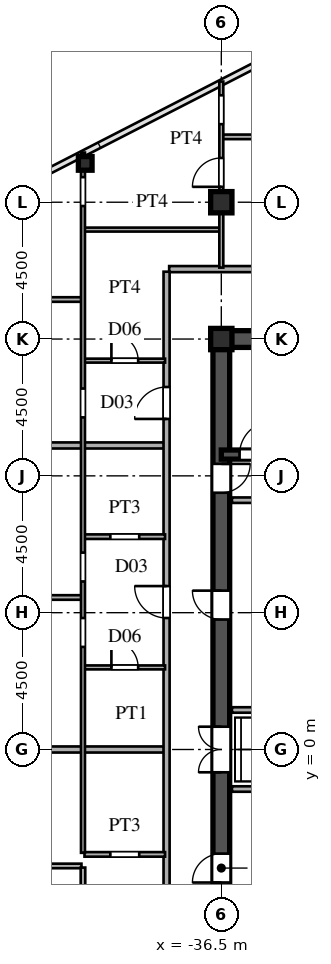
"""IFC4 building model, lengths in metres.
Left out: names, types, materials, properties, quantities, classifications, styles, units other than length and angle.
Written with IfcOpenShell. Run it as: python <this file> out.ifc"""

import sys

from ifc_helpers import new_model, si_unit, direction, frame, frame_2d, origin, origin_2d, place, context, subcontext, project, spatial, rectangle, hollow_rectangle, i_section, extrude, source, transform, mapped, element, fill, save


model = new_model("IFC4")
c1 = context("Model", 3, precision=1e-05, world=origin(), true_north=direction((0.0, 1.0)))
c2 = subcontext(c1, "Body", "Model", "MODEL_VIEW")
j1 = project(units=[si_unit("LENGTHUNIT", "METRE"), si_unit("PLANEANGLEUNIT", "RADIAN")], contexts=[c1])
p1 = place(None, origin())
s1 = spatial("IfcSite", under=j1, at=p1, CompositionType="ELEMENT")
p2 = place(p1, origin())
s2 = spatial("IfcBuilding", under=s1, at=p2, CompositionType="ELEMENT")
p3 = place(p2, frame((0.0, 0.0, 140.4)))
s3 = spatial("IfcBuildingStorey", under=s2, at=p3, CompositionType="ELEMENT", Elevation=140.4)
m1 = source(origin(), c2, "Body", "SweptSolid", [
    extrude(i_section(OverallWidth=0.7, OverallDepth=0.7, WebThickness=0.028, FlangeThickness=0.045, at=origin_2d()), origin(), (0.0, 0.0, 1.0), 3.6),
])
for number, where, z_axis, x_axis in (
    (1, (-36.5, 13.5, 0.0), (0.0, 0.0, 1.0), (1.0, 0.0, 0.0)),
    (2, (-36.5, 18.0, 0.0), (0.0, 0.0, 1.0), (1.0, 0.0, 0.0)),
):
    element("IfcColumn", number, at=place(p3, frame(where, z_axis=z_axis, x_axis=x_axis)), inside=s3, PredefinedType="COLUMN", context=c2, shape_type="MappedRepresentation", body=[
        mapped(m1, transform((0.0, 0.0, 0.0), scale=1.0)),
    ])
m2 = source(origin(), c2, "Body", "SweptSolid", [
    extrude(hollow_rectangle(XDim=0.45, YDim=0.45, WallThickness=0.018, at=origin_2d()), origin(), (0.0, 0.0, 1.0), 3.6),
])
p4 = place(p3, frame((-40.976, 19.278, 0.0), z_axis=(0.0, 0.0, 1.0), x_axis=(1.0, 0.0, 0.0)))
e3 = element("IfcColumn", 3, at=p4, inside=s3, PredefinedType="COLUMN", context=c2, shape_type="MappedRepresentation", body=[
    mapped(m2, transform((0.0, 0.0, 0.0), scale=1.0)),
])
p5 = place(p3, frame((-36.5, 13.5, 0.0), z_axis=(0.0, 0.0, 1.0), x_axis=(1.0, 0.0, 0.0)))
e4 = element("IfcWall", 4, at=p5, inside=s3, PredefinedType="SHEAR", context=c2, shape_type="SweptSolid", body=[
    extrude(rectangle(XDim=9.0, YDim=0.55, at=frame_2d((4.5, 0.0))), origin(), (0.0, 0.0, 1.0), 3.38),
])
p6 = place(p3, frame((-36.5, -1.3, 0.0), z_axis=(0.0, 0.0, 1.0), x_axis=(0.0, 1.0, 0.0)))
e5 = element("IfcWall", 5, at=p6, inside=s3, PredefinedType="SHEAR", context=c2, shape_type="SweptSolid", body=[
    extrude(rectangle(XDim=2.6, YDim=0.55, at=frame_2d((1.3, 0.0))), origin(), (0.0, 0.0, 1.0), 3.38),
])
p7 = place(p6, frame((0.55, 0.0, 0.0)))
e6 = element("IfcOpeningElement", 6, at=p7, cuts=e5, PredefinedType="OPENING", context=c2, shape_type="SweptSolid", body=[
    extrude(rectangle(XDim=1.5, YDim=2.3, at=frame_2d((0.75, 1.15))), frame((0.0, 0.285, 0.0), z_axis=(0.0, -1.0, 0.0), x_axis=(1.0, 0.0, 0.0)), (0.0, 0.0, 1.0), 0.57),
])
p8 = place(p3, frame((-36.5, 8.2, 0.0), z_axis=(0.0, 0.0, 1.0), x_axis=(0.0, 1.0, 0.0)))
e7 = element("IfcWall", 7, at=p8, inside=s3, PredefinedType="SHEAR", context=c2, shape_type="SweptSolid", body=[
    extrude(rectangle(XDim=5.45, YDim=0.55, at=frame_2d((2.725, 0.0))), origin(), (0.0, 0.0, 1.0), 3.38),
])
p9 = place(p8, frame((0.245, 0.0, 0.0)))
e8 = element("IfcOpeningElement", 8, at=p9, cuts=e7, PredefinedType="OPENING", context=c2, shape_type="SweptSolid", body=[
    extrude(rectangle(XDim=0.95, YDim=2.15, at=frame_2d((0.475, 1.075))), frame((0.0, 0.285, 0.0), z_axis=(0.0, -1.0, 0.0), x_axis=(1.0, 0.0, 0.0)), (0.0, 0.0, 1.0), 0.57),
])
p10 = place(p3, frame((-36.5, -6.5, 0.0), z_axis=(0.0, 0.0, 1.0), x_axis=(0.0, 1.0, 0.0)))
e9 = element("IfcWall", 9, at=p10, inside=s3, PredefinedType="SHEAR", context=c2, shape_type="SweptSolid", body=[
    extrude(rectangle(XDim=5.2, YDim=0.55, at=frame_2d((2.6, 0.0))), origin(), (0.0, 0.0, 1.0), 3.38),
])
p11 = place(p10, frame((2.125, 0.0, 0.0)))
e10 = element("IfcOpeningElement", 10, at=p11, cuts=e9, PredefinedType="OPENING", context=c2, shape_type="SweptSolid", body=[
    extrude(rectangle(XDim=0.95, YDim=2.15, at=frame_2d((0.475, 1.075))), frame((0.0, 0.285, 0.0), z_axis=(0.0, -1.0, 0.0), x_axis=(1.0, 0.0, 0.0)), (0.0, 0.0, 1.0), 0.57),
])
p12 = place(p3, frame((-36.5, 1.3, 0.0), z_axis=(0.0, 0.0, 1.0), x_axis=(0.0, 1.0, 0.0)))
e11 = element("IfcWall", 11, at=p12, inside=s3, PredefinedType="SHEAR", context=c2, shape_type="SweptSolid", body=[
    extrude(rectangle(XDim=6.9, YDim=0.55, at=frame_2d((3.45, 0.0))), origin(), (0.0, 0.0, 1.0), 3.38),
])
p13 = place(p12, frame((2.975, 0.0, 0.0)))
e12 = element("IfcOpeningElement", 12, at=p13, cuts=e11, PredefinedType="OPENING", context=c2, shape_type="SweptSolid", body=[
    extrude(rectangle(XDim=0.95, YDim=2.15, at=frame_2d((0.475, 1.075))), frame((0.0, 0.285, 0.0), z_axis=(0.0, -1.0, 0.0), x_axis=(1.0, 0.0, 0.0)), (0.0, 0.0, 1.0), 0.57),
])
p14 = place(p3, frame((-36.5, 9.7, 0.0), z_axis=(0.0, 0.0, 1.0), x_axis=(1.0, 0.0, 0.0)))
e13 = element("IfcWall", 13, at=p14, inside=s3, PredefinedType="SHEAR", context=c2, shape_type="SweptSolid", body=[
    extrude(rectangle(XDim=9.0, YDim=0.3, at=frame_2d((4.5, 0.0))), origin(), (0.0, 0.0, 1.0), 3.38),
])
p15 = place(p14, frame((0.6, 0.0, 0.0)))
e14 = element("IfcOpeningElement", 14, at=p15, cuts=e13, PredefinedType="OPENING", context=c2, shape_type="SweptSolid", body=[
    extrude(rectangle(XDim=1.1, YDim=2.2, at=frame_2d((0.55, 1.1))), frame((0.0, 0.16, 0.0), z_axis=(0.0, -1.0, 0.0), x_axis=(1.0, 0.0, 0.0)), (0.0, 0.0, 1.0), 0.32),
])
p16 = place(p3, frame((-36.15, 8.2, 0.0), z_axis=(0.0, 0.0, 1.0), x_axis=(1.0, 0.0, 0.0)))
e15 = element("IfcWall", 15, at=p16, inside=s3, PredefinedType="PARTITIONING", context=c2, shape_type="SweptSolid", body=[
    extrude(rectangle(XDim=5.7, YDim=0.18, at=frame_2d((2.85, 0.0))), origin(), (0.0, 0.0, 1.0), 3.38),
])
for number, where, z_axis, x_axis in (
    (16, (-36.15, -1.3, 0.0), (0.0, 0.0, 1.0), (1.0, 0.0, 0.0)),
    (17, (-36.15, 1.3, 0.0), (0.0, 0.0, 1.0), (1.0, 0.0, 0.0)),
):
    element("IfcWall", number, at=place(p3, frame(where, z_axis=z_axis, x_axis=x_axis)), inside=s3, PredefinedType="PARTITIONING", context=c2, shape_type="SweptSolid", body=[
        extrude(rectangle(XDim=2.95, YDim=0.18, at=frame_2d((1.475, 0.0))), origin(), (0.0, 0.0, 1.0), 3.38),
    ])
p17 = place(p3, frame((-69.535, -3.83, 0.0), z_axis=(0.0, 0.0, 1.0), x_axis=(1.0, 0.0, 0.0)))
e18 = element("IfcWall", 18, at=p17, inside=s3, PredefinedType="PARTITIONING", context=c2, shape_type="SweptSolid", body=[
    extrude(rectangle(XDim=28.435, YDim=0.15, at=frame_2d((14.217, 0.0))), origin(), (0.0, 0.0, 1.0), 3.38),
])
p18 = place(p17, frame((21.285, 0.0, 0.0)))
e19 = element("IfcOpeningElement", 19, at=p18, cuts=e18, PredefinedType="OPENING", context=c2, shape_type="SweptSolid", body=[
    extrude(rectangle(XDim=0.95, YDim=2.15, at=frame_2d((0.475, 1.075))), frame((0.0, 0.085, 0.0), z_axis=(0.0, -1.0, 0.0), x_axis=(1.0, 0.0, 0.0)), (0.0, 0.0, 1.0), 0.17),
])
p19 = place(p3, frame((-41.0, -3.45, 0.0), z_axis=(0.0, 0.0, 1.0), x_axis=(1.0, 0.0, 0.0)))
e20 = element("IfcWall", 20, at=p19, inside=s3, PredefinedType="PARTITIONING", context=c2, shape_type="SweptSolid", body=[
    extrude(rectangle(XDim=2.65, YDim=0.15, at=frame_2d((1.325, 0.0))), origin(), (0.0, 0.0, 1.0), 3.38),
])
p20 = place(p19, frame((0.85, 0.0, 0.0)))
e21 = element("IfcOpeningElement", 21, at=p20, cuts=e20, PredefinedType="OPENING", context=c2, shape_type="SweptSolid", body=[
    extrude(rectangle(XDim=0.95, YDim=2.15, at=frame_2d((0.475, 1.075))), frame((0.0, 0.085, 0.0), z_axis=(0.0, -1.0, 0.0), x_axis=(1.0, 0.0, 0.0)), (0.0, 0.0, 1.0), 0.17),
])
p21 = place(p3, frame((-69.505, 0.0, 0.0), z_axis=(0.0, 0.0, 1.0), x_axis=(1.0, 0.0, 0.0)))
e22 = element("IfcWall", 22, at=p21, inside=s3, PredefinedType="PARTITIONING", context=c2, shape_type="SweptSolid", body=[
    extrude(rectangle(XDim=31.125, YDim=0.2, at=frame_2d((15.562, 0.0))), origin(), (0.0, 0.0, 1.0), 3.38),
])
p22 = place(p3, frame((-41.0, 2.7, 0.0), z_axis=(0.0, 0.0, 1.0), x_axis=(1.0, 0.0, 0.0)))
e23 = element("IfcWall", 23, at=p22, inside=s3, PredefinedType="PARTITIONING", context=c2, shape_type="SweptSolid", body=[
    extrude(rectangle(XDim=2.65, YDim=0.13, at=frame_2d((1.325, 0.0))), origin(), (0.0, 0.0, 1.0), 3.38),
])
p23 = place(p22, frame((0.885, 0.0, 0.0)))
e24 = element("IfcOpeningElement", 24, at=p23, cuts=e23, PredefinedType="OPENING", context=c2, shape_type="SweptSolid", body=[
    extrude(rectangle(XDim=0.88, YDim=2.1, at=frame_2d((0.44, 1.05))), frame((0.0, 0.075, 0.0), z_axis=(0.0, -1.0, 0.0), x_axis=(1.0, 0.0, 0.0)), (0.0, 0.0, 1.0), 0.15),
])
p24 = place(p3, frame((-69.226, 5.0, 0.0), z_axis=(0.0, 0.0, 1.0), x_axis=(1.0, 0.0, 0.0)))
e25 = element("IfcWall", 25, at=p24, inside=s3, PredefinedType="PARTITIONING", context=c2, shape_type="SweptSolid", body=[
    extrude(rectangle(XDim=28.126, YDim=0.15, at=frame_2d((14.063, 0.0))), origin(), (0.0, 0.0, 1.0), 3.38),
])
p25 = place(p24, frame((11.401, 0.0, 0.0)))
e26 = element("IfcOpeningElement", 26, at=p25, cuts=e25, PredefinedType="OPENING", context=c2, shape_type="SweptSolid", body=[
    extrude(rectangle(XDim=0.95, YDim=2.15, at=frame_2d((0.475, 1.075))), frame((0.0, 0.085, 0.0), z_axis=(0.0, -1.0, 0.0), x_axis=(1.0, 0.0, 0.0)), (0.0, 0.0, 1.0), 0.17),
])
p26 = place(p24, frame((17.614, 0.0, 0.0)))
e27 = element("IfcOpeningElement", 27, at=p26, cuts=e25, PredefinedType="OPENING", context=c2, shape_type="SweptSolid", body=[
    extrude(rectangle(XDim=0.95, YDim=2.15, at=frame_2d((0.475, 1.075))), frame((0.0, 0.085, 0.0), z_axis=(0.0, -1.0, 0.0), x_axis=(1.0, 0.0, 0.0)), (0.0, 0.0, 1.0), 0.17),
])
p27 = place(p3, frame((-41.0, 7.0, 0.0), z_axis=(0.0, 0.0, 1.0), x_axis=(1.0, 0.0, 0.0)))
e28 = element("IfcWall", 28, at=p27, inside=s3, PredefinedType="PARTITIONING", context=c2, shape_type="SweptSolid", body=[
    extrude(rectangle(XDim=2.65, YDim=0.15, at=frame_2d((1.325, 0.0))), origin(), (0.0, 0.0, 1.0), 3.38),
])
p28 = place(p27, frame((0.85, 0.0, 0.0)))
e29 = element("IfcOpeningElement", 29, at=p28, cuts=e28, PredefinedType="OPENING", context=c2, shape_type="SweptSolid", body=[
    extrude(rectangle(XDim=0.95, YDim=2.15, at=frame_2d((0.475, 1.075))), frame((0.0, 0.085, 0.0), z_axis=(0.0, -1.0, 0.0), x_axis=(1.0, 0.0, 0.0)), (0.0, 0.0, 1.0), 0.17),
])
p29 = place(p3, frame((-59.767, 10.0, 0.0), z_axis=(0.0, 0.0, 1.0), x_axis=(1.0, 0.0, 0.0)))
e30 = element("IfcWall", 30, at=p29, inside=s3, PredefinedType="PARTITIONING", context=c2, shape_type="SweptSolid", body=[
    extrude(rectangle(XDim=21.387, YDim=0.2, at=frame_2d((10.694, 0.0))), origin(), (0.0, 0.0, 1.0), 3.38),
])
p30 = place(p3, frame((-41.0, 12.79, 0.0), z_axis=(0.0, 0.0, 1.0), x_axis=(1.0, 0.0, 0.0)))
e31 = element("IfcWall", 31, at=p30, inside=s3, PredefinedType="PARTITIONING", context=c2, shape_type="SweptSolid", body=[
    extrude(rectangle(XDim=2.65, YDim=0.13, at=frame_2d((1.325, 0.0))), origin(), (0.0, 0.0, 1.0), 3.38),
])
p31 = place(p30, frame((0.885, 0.0, 0.0)))
e32 = element("IfcOpeningElement", 32, at=p31, cuts=e31, PredefinedType="OPENING", context=c2, shape_type="SweptSolid", body=[
    extrude(rectangle(XDim=0.88, YDim=2.1, at=frame_2d((0.44, 1.05))), frame((0.0, 0.075, 0.0), z_axis=(0.0, -1.0, 0.0), x_axis=(1.0, 0.0, 0.0)), (0.0, 0.0, 1.0), 0.15),
])
p32 = place(p3, frame((-50.438, 14.8, 0.0), z_axis=(0.0, 0.0, 1.0), x_axis=(1.0, 0.0, 0.0)))
e33 = element("IfcWall", 33, at=p32, inside=s3, PredefinedType="PARTITIONING", context=c2, shape_type="SweptSolid", body=[
    extrude(rectangle(XDim=9.338, YDim=0.15, at=frame_2d((4.669, 0.0))), origin(), (0.0, 0.0, 1.0), 3.38),
])
p33 = place(p32, frame((5.551, 0.0, 0.0)))
e34 = element("IfcOpeningElement", 34, at=p33, cuts=e33, PredefinedType="OPENING", context=c2, shape_type="SweptSolid", body=[
    extrude(rectangle(XDim=0.95, YDim=2.15, at=frame_2d((0.475, 1.075))), frame((0.0, 0.085, 0.0), z_axis=(0.0, -1.0, 0.0), x_axis=(1.0, 0.0, 0.0)), (0.0, 0.0, 1.0), 0.17),
])
p34 = place(p3, frame((-38.215, 15.8, 0.0), z_axis=(0.0, 0.0, 1.0), x_axis=(1.0, 0.0, 0.0)))
e35 = element("IfcWall", 35, at=p34, inside=s3, PredefinedType="PARTITIONING", context=c2, shape_type="SweptSolid", body=[
    extrude(rectangle(XDim=10.715, YDim=0.2, at=frame_2d((5.357, 0.0))), origin(), (0.0, 0.0, 1.0), 3.38),
])
p35 = place(p3, frame((-41.0, 17.1, 0.0), z_axis=(0.0, 0.0, 1.0), x_axis=(1.0, 0.0, 0.0)))
e36 = element("IfcWall", 36, at=p35, inside=s3, PredefinedType="PARTITIONING", context=c2, shape_type="SweptSolid", body=[
    extrude(rectangle(XDim=4.45, YDim=0.13, at=frame_2d((2.225, 0.0))), origin(), (0.0, 0.0, 1.0), 3.38),
])
p36 = place(p3, frame((-36.45, 20.15, 0.0), z_axis=(0.0, 0.0, 1.0), x_axis=(1.0, 0.0, 0.0)))
e37 = element("IfcWall", 37, at=p36, inside=s3, PredefinedType="PARTITIONING", context=c2, shape_type="SweptSolid", body=[
    extrude(rectangle(XDim=8.649, YDim=0.15, at=frame_2d((4.325, 0.0))), origin(), (0.0, 0.0, 1.0), 3.38),
])
p37 = place(p3, frame((-41.05, -7.617, 0.0), z_axis=(0.0, 0.0, 1.0), x_axis=(0.0, 1.0, 0.0)))
e38 = element("IfcWall", 38, at=p37, inside=s3, PredefinedType="PARTITIONING", context=c2, shape_type="SweptSolid", body=[
    extrude(rectangle(XDim=3.734, YDim=0.15, at=frame_2d((1.867, 0.0))), origin(), (0.0, 0.0, 1.0), 2.99),
])
p38 = place(p37, frame((1.392, 0.0, 0.0)))
e39 = element("IfcOpeningElement", 39, at=p38, cuts=e38, PredefinedType="OPENING", context=c2, shape_type="SweptSolid", body=[
    extrude(rectangle(XDim=0.95, YDim=2.15, at=frame_2d((0.475, 1.075))), frame((0.0, 0.085, 0.0), z_axis=(0.0, -1.0, 0.0), x_axis=(1.0, 0.0, 0.0)), (0.0, 0.0, 1.0), 0.17),
])
p39 = place(p3, frame((-41.05, -3.398, 0.0), z_axis=(0.0, 0.0, 1.0), x_axis=(0.0, 1.0, 0.0)))
e40 = element("IfcWall", 40, at=p39, inside=s3, PredefinedType="PARTITIONING", context=c2, shape_type="SweptSolid", body=[
    extrude(rectangle(XDim=23.032, YDim=0.13, at=frame_2d((11.516, 0.0))), origin(), (0.0, 0.0, 1.0), 2.99),
])
p40 = place(p39, frame((6.772, 0.0, 0.0)))
e41 = element("IfcOpeningElement", 41, at=p40, cuts=e40, PredefinedType="OPENING", context=c2, shape_type="SweptSolid", body=[
    extrude(rectangle(XDim=0.95, YDim=2.15, at=frame_2d((0.475, 1.075))), frame((0.0, 0.075, 0.0), z_axis=(0.0, -1.0, 0.0), x_axis=(1.0, 0.0, 0.0)), (0.0, 0.0, 1.0), 0.15),
])
p41 = place(p39, frame((8.924, 0.0, 0.0)))
e42 = element("IfcOpeningElement", 42, at=p41, cuts=e40, PredefinedType="OPENING", context=c2, shape_type="SweptSolid", body=[
    extrude(rectangle(XDim=0.95, YDim=2.15, at=frame_2d((0.475, 1.075))), frame((0.0, 0.075, 0.0), z_axis=(0.0, -1.0, 0.0), x_axis=(1.0, 0.0, 0.0)), (0.0, 0.0, 1.0), 0.15),
])
p42 = place(p39, frame((14.321, 0.0, 0.0)))
e43 = element("IfcOpeningElement", 43, at=p42, cuts=e40, PredefinedType="OPENING", context=c2, shape_type="SweptSolid", body=[
    extrude(rectangle(XDim=0.95, YDim=2.15, at=frame_2d((0.475, 1.075))), frame((0.0, 0.075, 0.0), z_axis=(0.0, -1.0, 0.0), x_axis=(1.0, 0.0, 0.0)), (0.0, 0.0, 1.0), 0.15),
])
p43 = place(p39, frame((21.273, 0.0, 0.0)))
e44 = element("IfcOpeningElement", 44, at=p43, cuts=e40, PredefinedType="OPENING", context=c2, shape_type="SweptSolid", body=[
    extrude(rectangle(XDim=0.95, YDim=2.15, at=frame_2d((0.475, 1.075))), frame((0.0, 0.075, 0.0), z_axis=(0.0, -1.0, 0.0), x_axis=(1.0, 0.0, 0.0)), (0.0, 0.0, 1.0), 0.15),
])
p44 = place(p3, frame((-38.3, -15.715, 0.0), z_axis=(0.0, 0.0, 1.0), x_axis=(0.0, 1.0, 0.0)))
e45 = element("IfcWall", 45, at=p44, inside=s3, PredefinedType="PARTITIONING", context=c2, shape_type="SweptSolid", body=[
    extrude(rectangle(XDim=31.43, YDim=0.2, at=frame_2d((15.715, 0.0))), origin(), (0.0, 0.0, 1.0), 3.38),
])
p45 = place(p44, frame((2.39, 0.0, 0.0)))
e46 = element("IfcOpeningElement", 46, at=p45, cuts=e45, PredefinedType="OPENING", context=c2, shape_type="SweptSolid", body=[
    extrude(rectangle(XDim=1.05, YDim=2.25, at=frame_2d((0.525, 1.125))), frame((0.0, 0.11, 0.0), z_axis=(0.0, -1.0, 0.0), x_axis=(1.0, 0.0, 0.0)), (0.0, 0.0, 1.0), 0.22),
])
p46 = place(p44, frame((9.268, 0.0, 0.0)))
e47 = element("IfcOpeningElement", 47, at=p46, cuts=e45, PredefinedType="OPENING", context=c2, shape_type="SweptSolid", body=[
    extrude(rectangle(XDim=1.05, YDim=2.25, at=frame_2d((0.525, 1.125))), frame((0.0, 0.11, 0.0), z_axis=(0.0, -1.0, 0.0), x_axis=(1.0, 0.0, 0.0)), (0.0, 0.0, 1.0), 0.22),
])
p47 = place(p44, frame((20.04, 0.0, 0.0)))
e48 = element("IfcOpeningElement", 48, at=p47, cuts=e45, PredefinedType="OPENING", context=c2, shape_type="SweptSolid", body=[
    extrude(rectangle(XDim=1.05, YDim=2.25, at=frame_2d((0.525, 1.125))), frame((0.0, 0.11, 0.0), z_axis=(0.0, -1.0, 0.0), x_axis=(1.0, 0.0, 0.0)), (0.0, 0.0, 1.0), 0.22),
])
p48 = place(p44, frame((26.587, 0.0, 0.0)))
e49 = element("IfcOpeningElement", 49, at=p48, cuts=e45, PredefinedType="OPENING", context=c2, shape_type="SweptSolid", body=[
    extrude(rectangle(XDim=1.05, YDim=2.25, at=frame_2d((0.525, 1.125))), frame((0.0, 0.11, 0.0), z_axis=(0.0, -1.0, 0.0), x_axis=(1.0, 0.0, 0.0)), (0.0, 0.0, 1.0), 0.22),
])
p49 = place(p3, frame((-36.5, 15.85, 0.0), z_axis=(0.0, 0.0, 1.0), x_axis=(0.0, 1.0, 0.0)))
e50 = element("IfcWall", 50, at=p49, inside=s3, PredefinedType="PARTITIONING", context=c2, shape_type="SweptSolid", body=[
    extrude(rectangle(XDim=6.119, YDim=0.13, at=frame_2d((3.06, 0.0))), origin(), (0.0, 0.0, 1.0), 2.78),
])
p50 = place(p49, frame((2.656, 0.0, 0.0)))
e51 = element("IfcOpeningElement", 51, at=p50, cuts=e50, PredefinedType="OPENING", context=c2, shape_type="SweptSolid", body=[
    extrude(rectangle(XDim=0.95, YDim=2.15, at=frame_2d((0.475, 1.075))), frame((0.0, 0.075, 0.0), z_axis=(0.0, -1.0, 0.0), x_axis=(1.0, 0.0, 0.0)), (0.0, 0.0, 1.0), 0.15),
])
p51 = place(p49, frame((4.717, 0.0, 0.0)))
e52 = element("IfcOpeningElement", 52, at=p51, cuts=e50, PredefinedType="OPENING", context=c2, shape_type="SweptSolid", body=[
    extrude(rectangle(XDim=0.95, YDim=2.15, at=frame_2d((0.475, 1.075))), frame((0.0, 0.075, 0.0), z_axis=(0.0, -1.0, 0.0), x_axis=(1.0, 0.0, 0.0)), (0.0, 0.0, 1.0), 0.15),
])
m3 = source(origin(), c2, "Body", "SweptSolid", [
    extrude(rectangle(XDim=1.5, YDim=2.3, at=frame_2d((0.75, 1.15))), frame((0.0, 0.025, 0.0), z_axis=(0.0, -1.0, 0.0), x_axis=(1.0, 0.0, 0.0)), (0.0, 0.0, 1.0), 0.05),
])
p52 = place(p7, origin())
e53 = element("IfcDoor", 53, at=p52, inside=s3, OperationType="DOUBLE_SWING_LEFT", PredefinedType="DOOR", context=c2, shape_type="MappedRepresentation", body=[
    mapped(m3, transform((0.0, 0.0, 0.0), scale=1.0)),
])
fill(e6, e53)
m4 = source(origin(), c2, "Body", "SweptSolid", [
    extrude(rectangle(XDim=0.95, YDim=2.15, at=frame_2d((0.475, 1.075))), frame((0.0, 0.025, 0.0), z_axis=(0.0, -1.0, 0.0), x_axis=(1.0, 0.0, 0.0)), (0.0, 0.0, 1.0), 0.05),
])
p53 = place(p9, frame((0.95, 0.0, 0.0), z_axis=(0.0, 0.0, 1.0), x_axis=(-1.0, 0.0, 0.0)))
e54 = element("IfcDoor", 54, at=p53, inside=s3, OperationType="SINGLE_SWING_RIGHT", PredefinedType="DOOR", context=c2, shape_type="MappedRepresentation", body=[
    mapped(m4, transform((0.0, 0.0, 0.0), scale=1.0)),
])
fill(e8, e54)
p54 = place(p11, origin())
e55 = element("IfcDoor", 55, at=p54, inside=s3, OperationType="SINGLE_SWING_LEFT", PredefinedType="DOOR", context=c2, shape_type="MappedRepresentation", body=[
    mapped(m4, transform((0.0, 0.0, 0.0), scale=1.0)),
])
fill(e10, e55)
p55 = place(p13, origin())
e56 = element("IfcDoor", 56, at=p55, inside=s3, OperationType="SINGLE_SWING_RIGHT", PredefinedType="DOOR", context=c2, shape_type="MappedRepresentation", body=[
    mapped(m4, transform((0.0, 0.0, 0.0), scale=1.0)),
])
fill(e12, e56)
m5 = source(origin(), c2, "Body", "SweptSolid", [
    extrude(rectangle(XDim=1.1, YDim=2.2, at=frame_2d((0.55, 1.1))), frame((0.0, 0.025, 0.0), z_axis=(0.0, -1.0, 0.0), x_axis=(1.0, 0.0, 0.0)), (0.0, 0.0, 1.0), 0.05),
])
p56 = place(p15, origin())
e57 = element("IfcDoor", 57, at=p56, inside=s3, OperationType="SINGLE_SWING_RIGHT", PredefinedType="DOOR", context=c2, shape_type="MappedRepresentation", body=[
    mapped(m5, transform((0.0, 0.0, 0.0), scale=1.0)),
])
fill(e14, e57)
m6 = source(origin(), c2, "Body", "SweptSolid", [
    extrude(rectangle(XDim=0.88, YDim=2.1, at=frame_2d((0.44, 1.05))), frame((0.0, 0.025, 0.0), z_axis=(0.0, -1.0, 0.0), x_axis=(1.0, 0.0, 0.0)), (0.0, 0.0, 1.0), 0.05),
])
p57 = place(p23, origin())
e58 = element("IfcDoor", 58, at=p57, inside=s3, OperationType="SINGLE_SWING_LEFT", PredefinedType="DOOR", context=c2, shape_type="MappedRepresentation", body=[
    mapped(m6, transform((0.0, 0.0, 0.0), scale=1.0)),
])
fill(e24, e58)
p58 = place(p31, origin())
e59 = element("IfcDoor", 59, at=p58, inside=s3, OperationType="SINGLE_SWING_LEFT", PredefinedType="DOOR", context=c2, shape_type="MappedRepresentation", body=[
    mapped(m6, transform((0.0, 0.0, 0.0), scale=1.0)),
])
fill(e32, e59)
m7 = source(origin(), c2, "Body", "SweptSolid", [
    extrude(rectangle(XDim=1.05, YDim=2.25, at=frame_2d((0.525, 1.125))), frame((0.0, 0.025, 0.0), z_axis=(0.0, -1.0, 0.0), x_axis=(1.0, 0.0, 0.0)), (0.0, 0.0, 1.0), 0.05),
])
p59 = place(p47, origin())
e60 = element("IfcDoor", 60, at=p59, inside=s3, OperationType="SINGLE_SWING_RIGHT", PredefinedType="DOOR", context=c2, shape_type="MappedRepresentation", body=[
    mapped(m7, transform((0.0, 0.0, 0.0), scale=1.0)),
])
fill(e48, e60)
p60 = place(p48, origin())
e61 = element("IfcDoor", 61, at=p60, inside=s3, OperationType="SINGLE_SWING_LEFT", PredefinedType="DOOR", context=c2, shape_type="MappedRepresentation", body=[
    mapped(m7, transform((0.0, 0.0, 0.0), scale=1.0)),
])
fill(e49, e61)
m8 = source(origin(), c2, "Body", "SweptSolid", [
    extrude(rectangle(XDim=0.95, YDim=2.15, at=frame_2d((0.475, 1.075))), frame((0.0, 0.025, 0.0), z_axis=(0.0, -1.0, 0.0), x_axis=(1.0, 0.0, 0.0)), (0.0, 0.0, 1.0), 0.05),
])
p61 = place(p50, origin())
e62 = element("IfcDoor", 62, at=p61, inside=s3, OperationType="SINGLE_SWING_LEFT", PredefinedType="DOOR", context=c2, shape_type="MappedRepresentation", body=[
    mapped(m8, transform((0.0, 0.0, 0.0), scale=1.0)),
])
fill(e51, e62)
save(model, sys.argv[1])
